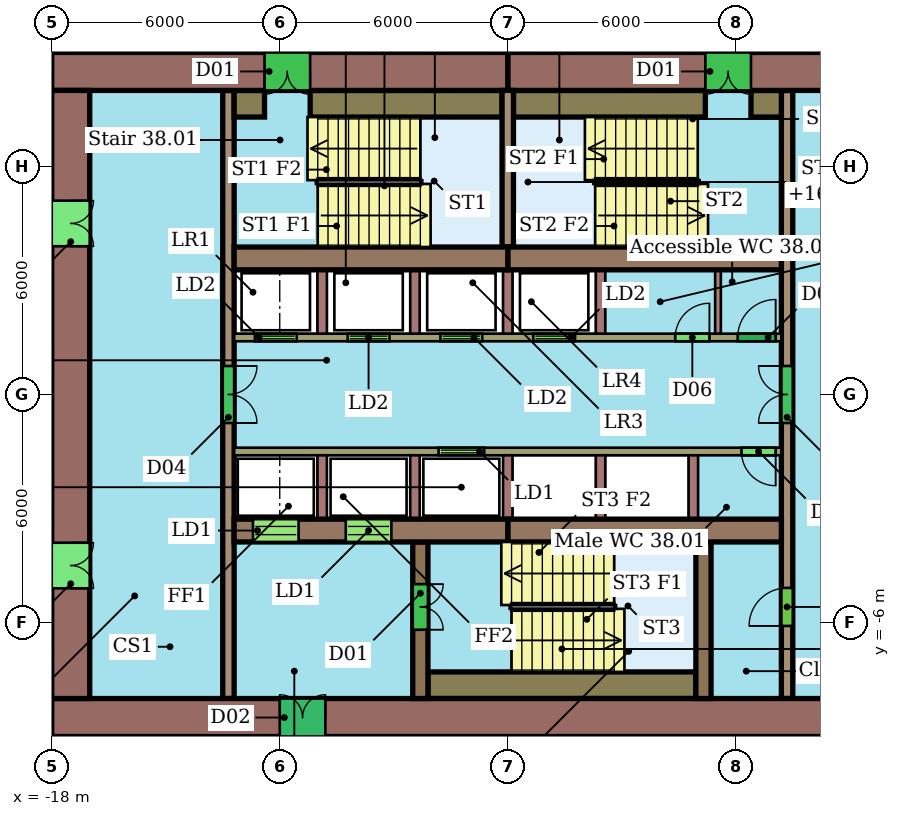
"""IFC4 building model, lengths in metres.
Left out: names, types, materials, properties, quantities, classifications, styles, units other than length and angle.
Written with IfcOpenShell. Run it as: python <this file> out.ifc"""

import sys

from ifc_helpers import new_model, si_unit, direction, frame, frame_2d, origin, place, context, subcontext, project, spatial, rectangle, extrude, element, fill, save


model = new_model("IFC4")
c1 = context("Model", 3, precision=1e-05, world=origin(), true_north=direction((0.0, 1.0)))
c2 = subcontext(c1, "Body", "Model", "MODEL_VIEW")
j1 = project(units=[si_unit("LENGTHUNIT", "METRE"), si_unit("PLANEANGLEUNIT", "RADIAN")], contexts=[c1])
p1 = place(None, origin())
s1 = spatial("IfcSite", under=j1, at=p1, CompositionType="ELEMENT")
p2 = place(p1, origin())
s2 = spatial("IfcBuilding", under=s1, at=p2, CompositionType="ELEMENT")
p3 = place(p2, frame((0.0, 0.0, 161.4)))
s3 = spatial("IfcBuildingStorey", under=s2, at=p3, CompositionType="ELEMENT", Elevation=161.4)
p4 = place(p3, frame((6.0, 8.5, 0.0), z_axis=(0.0, 0.0, 1.0), x_axis=(-1.0, 0.0, 0.0)))
e1 = element("IfcWall", 1, at=p4, inside=s3, PredefinedType="SHEAR", context=c2, shape_type="SweptSolid", body=[
    extrude(rectangle(XDim=12.0, YDim=1.0, at=frame_2d((6.0, 0.0))), origin(), (0.0, 0.0, 1.0), 3.3),
])
p5 = place(p4, frame((5.6, 0.0, 0.0)))
e2 = element("IfcOpeningElement", 2, at=p5, cuts=e1, PredefinedType="OPENING", context=c2, shape_type="SweptSolid", body=[
    extrude(rectangle(XDim=1.2, YDim=2.1, at=frame_2d((0.6, 1.05))), frame((0.0, 0.51, 0.0), z_axis=(0.0, -1.0, 0.0), x_axis=(1.0, 0.0, 0.0)), (0.0, 0.0, 1.0), 1.02),
])
p6 = place(p3, frame((-6.0, 8.5, 0.0), z_axis=(0.0, 0.0, 1.0), x_axis=(-1.0, 0.0, 0.0)))
e3 = element("IfcWall", 3, at=p6, inside=s3, PredefinedType="SHEAR", context=c2, shape_type="SweptSolid", body=[
    extrude(rectangle(XDim=12.0, YDim=1.0, at=frame_2d((6.0, 0.0))), origin(), (0.0, 0.0, 1.0), 3.3),
])
p7 = place(p6, frame((5.2, 0.0, 0.0)))
e4 = element("IfcOpeningElement", 4, at=p7, cuts=e3, PredefinedType="OPENING", context=c2, shape_type="SweptSolid", body=[
    extrude(rectangle(XDim=1.2, YDim=2.1, at=frame_2d((0.6, 1.05))), frame((0.0, 0.51, 0.0), z_axis=(0.0, -1.0, 0.0), x_axis=(1.0, 0.0, 0.0)), (0.0, 0.0, 1.0), 1.02),
])
p8 = place(p3, frame((-18.0, -8.5, 0.0), z_axis=(0.0, 0.0, 1.0), x_axis=(1.0, 0.0, 0.0)))
e5 = element("IfcWall", 5, at=p8, inside=s3, PredefinedType="SHEAR", context=c2, shape_type="SweptSolid", body=[
    extrude(rectangle(XDim=24.0, YDim=1.0, at=frame_2d((12.0, 0.0))), origin(), (0.0, 0.0, 1.0), 3.3),
])
p9 = place(p8, frame((6.0, 0.0, 0.0)))
e6 = element("IfcOpeningElement", 6, at=p9, cuts=e5, PredefinedType="OPENING", context=c2, shape_type="SweptSolid", body=[
    extrude(rectangle(XDim=1.2, YDim=2.1, at=frame_2d((0.6, 1.05))), frame((0.0, 0.51, 0.0), z_axis=(0.0, -1.0, 0.0), x_axis=(1.0, 0.0, 0.0)), (0.0, 0.0, 1.0), 1.02),
])
p10 = place(p3, frame((-17.5, 8.0, 0.0), z_axis=(0.0, 0.0, 1.0), x_axis=(0.0, -1.0, 0.0)))
e7 = element("IfcWall", 7, at=p10, inside=s3, PredefinedType="SHEAR", context=c2, shape_type="SweptSolid", body=[
    extrude(rectangle(XDim=16.0, YDim=1.0, at=frame_2d((8.0, 0.0))), origin(), (0.0, 0.0, 1.0), 3.3),
])
p11 = place(p10, frame((11.9, 0.0, 0.0)))
e8 = element("IfcOpeningElement", 8, at=p11, cuts=e7, PredefinedType="OPENING", context=c2, shape_type="SweptSolid", body=[
    extrude(rectangle(XDim=1.2, YDim=2.1, at=frame_2d((0.6, 1.05))), frame((0.0, 0.51, 0.0), z_axis=(0.0, -1.0, 0.0), x_axis=(1.0, 0.0, 0.0)), (0.0, 0.0, 1.0), 1.02),
])
p12 = place(p10, frame((2.9, 0.0, 0.0)))
e9 = element("IfcOpeningElement", 9, at=p12, cuts=e7, PredefinedType="OPENING", context=c2, shape_type="SweptSolid", body=[
    extrude(rectangle(XDim=1.2, YDim=2.1, at=frame_2d((0.6, 1.05))), frame((0.0, 0.51, 0.0), z_axis=(0.0, -1.0, 0.0), x_axis=(1.0, 0.0, 0.0)), (0.0, 0.0, 1.0), 1.02),
])
for number, where, z_axis, x_axis in (
    (10, (-13.2, 3.58, 0.0), (0.0, 0.0, 1.0), (1.0, 0.0, 0.0)),
    (11, (-6.0, 3.58, 0.0), (0.0, 0.0, 1.0), (1.0, 0.0, 0.0)),
):
    element("IfcWall", number, at=place(p3, frame(where, z_axis=z_axis, x_axis=x_axis)), inside=s3, PredefinedType="SHEAR", context=c2, shape_type="SweptSolid", body=[
        extrude(rectangle(XDim=7.2, YDim=0.6, at=frame_2d((3.6, 0.0))), origin(), (0.0, 0.0, 1.0), 3.3),
    ])
p13 = place(p3, frame((-13.2, -3.58, 0.0), z_axis=(0.0, 0.0, 1.0), x_axis=(1.0, 0.0, 0.0)))
e12 = element("IfcWall", 12, at=p13, inside=s3, PredefinedType="SHEAR", context=c2, shape_type="SweptSolid", body=[
    extrude(rectangle(XDim=7.2, YDim=0.6, at=frame_2d((3.6, 0.0))), origin(), (0.0, 0.0, 1.0), 3.3),
])
p14 = place(p13, frame((0.496, 0.0, 0.0)))
e13 = element("IfcOpeningElement", 13, at=p14, cuts=e12, PredefinedType="OPENING", context=c2, shape_type="SweptSolid", body=[
    extrude(rectangle(XDim=1.2, YDim=2.1, at=frame_2d((0.6, 1.05))), frame((0.0, 0.31, 0.0), z_axis=(0.0, -1.0, 0.0), x_axis=(1.0, 0.0, 0.0)), (0.0, 0.0, 1.0), 0.62),
])
p15 = place(p13, frame((2.938, 0.0, 0.0)))
e14 = element("IfcOpeningElement", 14, at=p15, cuts=e12, PredefinedType="OPENING", context=c2, shape_type="SweptSolid", body=[
    extrude(rectangle(XDim=1.2, YDim=2.1, at=frame_2d((0.6, 1.05))), frame((0.0, 0.31, 0.0), z_axis=(0.0, -1.0, 0.0), x_axis=(1.0, 0.0, 0.0)), (0.0, 0.0, 1.0), 0.62),
])
p16 = place(p3, frame((-6.0, -3.58, 0.0), z_axis=(0.0, 0.0, 1.0), x_axis=(1.0, 0.0, 0.0)))
e15 = element("IfcWall", 15, at=p16, inside=s3, PredefinedType="SHEAR", context=c2, shape_type="SweptSolid", body=[
    extrude(rectangle(XDim=7.2, YDim=0.6, at=frame_2d((3.6, 0.0))), origin(), (0.0, 0.0, 1.0), 3.3),
])
p17 = place(p3, frame((-13.35, 8.0, 0.0), z_axis=(0.0, 0.0, 1.0), x_axis=(0.0, -1.0, 0.0)))
e16 = element("IfcWall", 16, at=p17, inside=s3, PredefinedType="SHEAR", context=c2, shape_type="SweptSolid", body=[
    extrude(rectangle(XDim=16.0, YDim=0.3, at=frame_2d((8.0, 0.0))), origin(), (0.0, 0.0, 1.0), 3.3),
])
p18 = place(p17, frame((7.25, 0.0, 0.0)))
e17 = element("IfcOpeningElement", 17, at=p18, cuts=e16, PredefinedType="OPENING", context=c2, shape_type="SweptSolid", body=[
    extrude(rectangle(XDim=1.5, YDim=2.1, at=frame_2d((0.75, 1.05))), frame((0.0, 0.16, 0.0), z_axis=(0.0, -1.0, 0.0), x_axis=(1.0, 0.0, 0.0)), (0.0, 0.0, 1.0), 0.32),
])
p19 = place(p3, frame((1.35, -8.0, 0.0), z_axis=(0.0, 0.0, 1.0), x_axis=(0.0, 1.0, 0.0)))
e18 = element("IfcWall", 18, at=p19, inside=s3, PredefinedType="SHEAR", context=c2, shape_type="SweptSolid", body=[
    extrude(rectangle(XDim=16.0, YDim=0.3, at=frame_2d((8.0, 0.0))), origin(), (0.0, 0.0, 1.0), 3.3),
])
p20 = place(p19, frame((1.91, 0.0, 0.0)))
e19 = element("IfcOpeningElement", 19, at=p20, cuts=e18, PredefinedType="OPENING", context=c2, shape_type="SweptSolid", body=[
    extrude(rectangle(XDim=1.0, YDim=2.1, at=frame_2d((0.5, 1.05))), frame((0.0, 0.16, 0.0), z_axis=(0.0, -1.0, 0.0), x_axis=(1.0, 0.0, 0.0)), (0.0, 0.0, 1.0), 0.32),
])
p21 = place(p19, frame((7.25, 0.0, 0.0)))
e20 = element("IfcOpeningElement", 20, at=p21, cuts=e18, PredefinedType="OPENING", context=c2, shape_type="SweptSolid", body=[
    extrude(rectangle(XDim=1.5, YDim=2.1, at=frame_2d((0.75, 1.05))), frame((0.0, 0.16, 0.0), z_axis=(0.0, -1.0, 0.0), x_axis=(1.0, 0.0, 0.0)), (0.0, 0.0, 1.0), 0.32),
])
p22 = place(p3, frame((-13.2, 1.5, 0.0), z_axis=(0.0, 0.0, 1.0), x_axis=(1.0, 0.0, 0.0)))
e21 = element("IfcWall", 21, at=p22, inside=s3, PredefinedType="SHEAR", context=c2, shape_type="SweptSolid", body=[
    extrude(rectangle(XDim=14.4, YDim=0.2, at=frame_2d((7.2, 0.0))), origin(), (0.0, 0.0, 1.0), 3.3),
])
p23 = place(p22, frame((0.546, 0.0, 0.0)))
e22 = element("IfcOpeningElement", 22, at=p23, cuts=e21, PredefinedType="OPENING", context=c2, shape_type="SweptSolid", body=[
    extrude(rectangle(XDim=1.1, YDim=2.1, at=frame_2d((0.55, 1.05))), frame((0.0, 0.11, 0.0), z_axis=(0.0, -1.0, 0.0), x_axis=(1.0, 0.0, 0.0)), (0.0, 0.0, 1.0), 0.22),
])
p24 = place(p22, frame((2.988, 0.0, 0.0)))
e23 = element("IfcOpeningElement", 23, at=p24, cuts=e21, PredefinedType="OPENING", context=c2, shape_type="SweptSolid", body=[
    extrude(rectangle(XDim=1.1, YDim=2.1, at=frame_2d((0.55, 1.05))), frame((0.0, 0.11, 0.0), z_axis=(0.0, -1.0, 0.0), x_axis=(1.0, 0.0, 0.0)), (0.0, 0.0, 1.0), 0.22),
])
p25 = place(p22, frame((5.429, 0.0, 0.0)))
e24 = element("IfcOpeningElement", 24, at=p25, cuts=e21, PredefinedType="OPENING", context=c2, shape_type="SweptSolid", body=[
    extrude(rectangle(XDim=1.1, YDim=2.1, at=frame_2d((0.55, 1.05))), frame((0.0, 0.11, 0.0), z_axis=(0.0, -1.0, 0.0), x_axis=(1.0, 0.0, 0.0)), (0.0, 0.0, 1.0), 0.22),
])
p26 = place(p22, frame((7.871, 0.0, 0.0)))
e25 = element("IfcOpeningElement", 25, at=p26, cuts=e21, PredefinedType="OPENING", context=c2, shape_type="SweptSolid", body=[
    extrude(rectangle(XDim=1.1, YDim=2.1, at=frame_2d((0.55, 1.05))), frame((0.0, 0.11, 0.0), z_axis=(0.0, -1.0, 0.0), x_axis=(1.0, 0.0, 0.0)), (0.0, 0.0, 1.0), 0.22),
])
p27 = place(p22, frame((11.607, 0.0, 0.0)))
e26 = element("IfcOpeningElement", 26, at=p27, cuts=e21, PredefinedType="OPENING", context=c2, shape_type="SweptSolid", body=[
    extrude(rectangle(XDim=0.9, YDim=2.1, at=frame_2d((0.45, 1.05))), frame((0.0, 0.11, 0.0), z_axis=(0.0, -1.0, 0.0), x_axis=(1.0, 0.0, 0.0)), (0.0, 0.0, 1.0), 0.22),
])
p28 = place(p22, frame((13.25, 0.0, 0.0)))
e27 = element("IfcOpeningElement", 27, at=p28, cuts=e21, PredefinedType="OPENING", context=c2, shape_type="SweptSolid", body=[
    extrude(rectangle(XDim=1.0, YDim=2.1, at=frame_2d((0.5, 1.05))), frame((0.0, 0.11, 0.0), z_axis=(0.0, -1.0, 0.0), x_axis=(1.0, 0.0, 0.0)), (0.0, 0.0, 1.0), 0.22),
])
p29 = place(p3, frame((1.2, -1.5, 0.0), z_axis=(0.0, 0.0, 1.0), x_axis=(-1.0, 0.0, 0.0)))
e28 = element("IfcWall", 28, at=p29, inside=s3, PredefinedType="SHEAR", context=c2, shape_type="SweptSolid", body=[
    extrude(rectangle(XDim=14.4, YDim=0.2, at=frame_2d((7.2, 0.0))), origin(), (0.0, 0.0, 1.0), 3.3),
])
p30 = place(p29, frame((7.821, 0.0, 0.0)))
e29 = element("IfcOpeningElement", 29, at=p30, cuts=e28, PredefinedType="OPENING", context=c2, shape_type="SweptSolid", body=[
    extrude(rectangle(XDim=1.2, YDim=2.1, at=frame_2d((0.6, 1.05))), frame((0.0, 0.11, 0.0), z_axis=(0.0, -1.0, 0.0), x_axis=(1.0, 0.0, 0.0)), (0.0, 0.0, 1.0), 0.22),
])
p31 = place(p29, frame((0.15, 0.0, 0.0)))
e30 = element("IfcOpeningElement", 30, at=p31, cuts=e28, PredefinedType="OPENING", context=c2, shape_type="SweptSolid", body=[
    extrude(rectangle(XDim=0.9, YDim=2.1, at=frame_2d((0.45, 1.05))), frame((0.0, 0.11, 0.0), z_axis=(0.0, -1.0, 0.0), x_axis=(1.0, 0.0, 0.0)), (0.0, 0.0, 1.0), 0.22),
])
p32 = place(p3, frame((-8.3, -3.88, 0.0), z_axis=(0.0, 0.0, 1.0), x_axis=(0.0, -1.0, 0.0)))
e31 = element("IfcWall", 31, at=p32, inside=s3, PredefinedType="SHEAR", context=c2, shape_type="SweptSolid", body=[
    extrude(rectangle(XDim=4.12, YDim=0.4, at=frame_2d((2.06, 0.0))), origin(), (0.0, 0.0, 1.0), 3.3),
])
p33 = place(p32, frame((1.11, 0.0, 0.0)))
e32 = element("IfcOpeningElement", 32, at=p33, cuts=e31, PredefinedType="OPENING", context=c2, shape_type="SweptSolid", body=[
    extrude(rectangle(XDim=1.2, YDim=2.1, at=frame_2d((0.6, 1.05))), frame((0.0, 0.21, 0.0), z_axis=(0.0, -1.0, 0.0), x_axis=(1.0, 0.0, 0.0)), (0.0, 0.0, 1.0), 0.42),
])
p34 = place(p3, frame((-0.85, -3.88, 0.0), z_axis=(0.0, 0.0, 1.0), x_axis=(0.0, -1.0, 0.0)))
e33 = element("IfcWall", 33, at=p34, inside=s3, PredefinedType="SHEAR", context=c2, shape_type="SweptSolid", body=[
    extrude(rectangle(XDim=4.12, YDim=0.4, at=frame_2d((2.06, 0.0))), origin(), (0.0, 0.0, 1.0), 3.3),
])
p35 = place(p3, frame((-6.0, 3.88, 0.0), z_axis=(0.0, 0.0, 1.0), x_axis=(0.0, 1.0, 0.0)))
e34 = element("IfcWall", 34, at=p35, inside=s3, PredefinedType="SHEAR", context=c2, shape_type="SweptSolid", body=[
    extrude(rectangle(XDim=4.12, YDim=0.3, at=frame_2d((2.06, 0.0))), origin(), (0.0, 0.0, 1.0), 3.3),
])
p36 = place(p3, frame((-13.2, 7.65, 0.0), z_axis=(0.0, 0.0, 1.0), x_axis=(1.0, 0.0, 0.0)))
e35 = element("IfcWall", 35, at=p36, inside=s3, PredefinedType="SHEAR", context=c2, shape_type="SweptSolid", body=[
    extrude(rectangle(XDim=0.8, YDim=0.7, at=frame_2d((0.4, 0.0))), origin(), (0.0, 0.0, 1.0), 3.3),
])
for number, where, z_axis, x_axis in (
    (36, (-11.2, 7.65, 0.0), (0.0, 0.0, 1.0), (1.0, 0.0, 0.0)),
    (37, (-5.85, 7.65, 0.0), (0.0, 0.0, 1.0), (1.0, 0.0, 0.0)),
):
    element("IfcWall", number, at=place(p3, frame(where, z_axis=z_axis, x_axis=x_axis)), inside=s3, PredefinedType="SHEAR", context=c2, shape_type="SweptSolid", body=[
        extrude(rectangle(XDim=5.05, YDim=0.7, at=frame_2d((2.525, 0.0))), origin(), (0.0, 0.0, 1.0), 3.3),
    ])
p37 = place(p3, frame((0.4, 7.65, 0.0), z_axis=(0.0, 0.0, 1.0), x_axis=(1.0, 0.0, 0.0)))
e38 = element("IfcWall", 38, at=p37, inside=s3, PredefinedType="SHEAR", context=c2, shape_type="SweptSolid", body=[
    extrude(rectangle(XDim=0.8, YDim=0.7, at=frame_2d((0.4, 0.0))), origin(), (0.0, 0.0, 1.0), 3.3),
])
p38 = place(p3, frame((-8.1, -7.65, 0.0), z_axis=(0.0, 0.0, 1.0), x_axis=(1.0, 0.0, 0.0)))
e39 = element("IfcWall", 39, at=p38, inside=s3, PredefinedType="SHEAR", context=c2, shape_type="SweptSolid", body=[
    extrude(rectangle(XDim=7.05, YDim=0.7, at=frame_2d((3.525, 0.0))), origin(), (0.0, 0.0, 1.0), 3.3),
])
for number, where, z_axis, x_axis in (
    (40, (-10.883, 1.6, 0.0), (0.0, 0.0, 1.0), (0.0, 1.0, 0.0)),
    (41, (-8.442, 1.6, 0.0), (0.0, 0.0, 1.0), (0.0, 1.0, 0.0)),
    (42, (-6.0, 1.6, 0.0), (0.0, 0.0, 1.0), (0.0, 1.0, 0.0)),
    (43, (-3.558, 1.6, 0.0), (0.0, 0.0, 1.0), (0.0, 1.0, 0.0)),
):
    element("IfcWall", number, at=place(p3, frame(where, z_axis=z_axis, x_axis=x_axis)), inside=s3, PredefinedType="SHEAR", context=c2, shape_type="SweptSolid", body=[
        extrude(rectangle(XDim=1.68, YDim=0.25, at=frame_2d((0.84, 0.0))), origin(), (0.0, 0.0, 1.0), 3.3),
    ])
p39 = place(p3, frame((-0.468, 1.6, 0.0), z_axis=(0.0, 0.0, 1.0), x_axis=(0.0, 1.0, 0.0)))
e44 = element("IfcWall", 44, at=p39, inside=s3, PredefinedType="PARTITIONING", context=c2, shape_type="SweptSolid", body=[
    extrude(rectangle(XDim=1.68, YDim=0.15, at=frame_2d((0.84, 0.0))), origin(), (0.0, 0.0, 1.0), 3.3),
])
for number, where, z_axis, x_axis in (
    (45, (-10.883, -1.6, 0.0), (0.0, 0.0, 1.0), (0.0, -1.0, 0.0)),
    (46, (-8.442, -1.6, 0.0), (0.0, 0.0, 1.0), (0.0, -1.0, 0.0)),
    (47, (-6.0, -1.6, 0.0), (0.0, 0.0, 1.0), (0.0, -1.0, 0.0)),
    (48, (-3.558, -1.6, 0.0), (0.0, 0.0, 1.0), (0.0, -1.0, 0.0)),
    (49, (-1.117, -1.6, 0.0), (0.0, 0.0, 1.0), (0.0, -1.0, 0.0)),
):
    element("IfcWall", number, at=place(p3, frame(where, z_axis=z_axis, x_axis=x_axis)), inside=s3, PredefinedType="SHEAR", context=c2, shape_type="SweptSolid", body=[
        extrude(rectangle(XDim=1.68, YDim=0.25, at=frame_2d((0.84, 0.0))), origin(), (0.0, 0.0, 1.0), 3.3),
    ])
p40 = place(p5, origin())
e50 = element("IfcDoor", 50, at=p40, inside=s3, OperationType="DOUBLE_DOOR_SINGLE_SWING", PredefinedType="NOTDEFINED", context=c2, shape_type="SweptSolid", body=[
    extrude(rectangle(XDim=1.2, YDim=2.1, at=frame_2d((0.6, 1.05))), frame((0.0, 0.025, 0.0), z_axis=(0.0, -1.0, 0.0), x_axis=(1.0, 0.0, 0.0)), (0.0, 0.0, 1.0), 0.05),
])
fill(e2, e50)
p41 = place(p7, origin())
e51 = element("IfcDoor", 51, at=p41, inside=s3, OperationType="DOUBLE_DOOR_SINGLE_SWING", PredefinedType="NOTDEFINED", context=c2, shape_type="SweptSolid", body=[
    extrude(rectangle(XDim=1.2, YDim=2.1, at=frame_2d((0.6, 1.05))), frame((0.0, 0.025, 0.0), z_axis=(0.0, -1.0, 0.0), x_axis=(1.0, 0.0, 0.0)), (0.0, 0.0, 1.0), 0.05),
])
fill(e4, e51)
p42 = place(p9, origin())
e52 = element("IfcDoor", 52, at=p42, inside=s3, OperationType="DOUBLE_DOOR_SINGLE_SWING", PredefinedType="NOTDEFINED", context=c2, shape_type="SweptSolid", body=[
    extrude(rectangle(XDim=1.2, YDim=2.1, at=frame_2d((0.6, 1.05))), frame((0.0, 0.025, 0.0), z_axis=(0.0, -1.0, 0.0), x_axis=(1.0, 0.0, 0.0)), (0.0, 0.0, 1.0), 0.05),
])
fill(e6, e52)
p43 = place(p11, origin())
e53 = element("IfcDoor", 53, at=p43, inside=s3, OperationType="DOUBLE_DOOR_SINGLE_SWING", PredefinedType="NOTDEFINED", context=c2, shape_type="SweptSolid", body=[
    extrude(rectangle(XDim=1.2, YDim=2.1, at=frame_2d((0.6, 1.05))), frame((0.0, 0.025, 0.0), z_axis=(0.0, -1.0, 0.0), x_axis=(1.0, 0.0, 0.0)), (0.0, 0.0, 1.0), 0.05),
])
fill(e8, e53)
p44 = place(p12, origin())
e54 = element("IfcDoor", 54, at=p44, inside=s3, OperationType="DOUBLE_DOOR_SINGLE_SWING", PredefinedType="NOTDEFINED", context=c2, shape_type="SweptSolid", body=[
    extrude(rectangle(XDim=1.2, YDim=2.1, at=frame_2d((0.6, 1.05))), frame((0.0, 0.025, 0.0), z_axis=(0.0, -1.0, 0.0), x_axis=(1.0, 0.0, 0.0)), (0.0, 0.0, 1.0), 0.05),
])
fill(e9, e54)
p45 = place(p14, origin())
e55 = element("IfcDoor", 55, at=p45, inside=s3, OperationType="DOUBLE_DOOR_SLIDING", PredefinedType="NOTDEFINED", context=c2, shape_type="SweptSolid", body=[
    extrude(rectangle(XDim=1.2, YDim=2.1, at=frame_2d((0.6, 1.05))), frame((0.0, 0.025, 0.0), z_axis=(0.0, -1.0, 0.0), x_axis=(1.0, 0.0, 0.0)), (0.0, 0.0, 1.0), 0.05),
])
fill(e13, e55)
p46 = place(p15, origin())
e56 = element("IfcDoor", 56, at=p46, inside=s3, OperationType="DOUBLE_DOOR_SLIDING", PredefinedType="NOTDEFINED", context=c2, shape_type="SweptSolid", body=[
    extrude(rectangle(XDim=1.2, YDim=2.1, at=frame_2d((0.6, 1.05))), frame((0.0, 0.025, 0.0), z_axis=(0.0, -1.0, 0.0), x_axis=(1.0, 0.0, 0.0)), (0.0, 0.0, 1.0), 0.05),
])
fill(e14, e56)
p47 = place(p18, origin())
e57 = element("IfcDoor", 57, at=p47, inside=s3, OperationType="DOUBLE_DOOR_SINGLE_SWING", PredefinedType="NOTDEFINED", context=c2, shape_type="SweptSolid", body=[
    extrude(rectangle(XDim=1.5, YDim=2.1, at=frame_2d((0.75, 1.05))), frame((0.0, 0.025, 0.0), z_axis=(0.0, -1.0, 0.0), x_axis=(1.0, 0.0, 0.0)), (0.0, 0.0, 1.0), 0.05),
])
fill(e17, e57)
p48 = place(p20, origin())
e58 = element("IfcDoor", 58, at=p48, inside=s3, OperationType="SINGLE_SWING_LEFT", PredefinedType="NOTDEFINED", context=c2, shape_type="SweptSolid", body=[
    extrude(rectangle(XDim=1.0, YDim=2.1, at=frame_2d((0.5, 1.05))), frame((0.0, 0.025, 0.0), z_axis=(0.0, -1.0, 0.0), x_axis=(1.0, 0.0, 0.0)), (0.0, 0.0, 1.0), 0.05),
])
fill(e19, e58)
p49 = place(p21, origin())
e59 = element("IfcDoor", 59, at=p49, inside=s3, OperationType="DOUBLE_DOOR_SINGLE_SWING", PredefinedType="NOTDEFINED", context=c2, shape_type="SweptSolid", body=[
    extrude(rectangle(XDim=1.5, YDim=2.1, at=frame_2d((0.75, 1.05))), frame((0.0, 0.025, 0.0), z_axis=(0.0, -1.0, 0.0), x_axis=(1.0, 0.0, 0.0)), (0.0, 0.0, 1.0), 0.05),
])
fill(e20, e59)
p50 = place(p23, origin())
e60 = element("IfcDoor", 60, at=p50, inside=s3, OperationType="DOUBLE_DOOR_SLIDING", PredefinedType="NOTDEFINED", context=c2, shape_type="SweptSolid", body=[
    extrude(rectangle(XDim=1.1, YDim=2.1, at=frame_2d((0.55, 1.05))), frame((0.0, 0.025, 0.0), z_axis=(0.0, -1.0, 0.0), x_axis=(1.0, 0.0, 0.0)), (0.0, 0.0, 1.0), 0.05),
])
fill(e22, e60)
p51 = place(p24, origin())
e61 = element("IfcDoor", 61, at=p51, inside=s3, OperationType="DOUBLE_DOOR_SLIDING", PredefinedType="NOTDEFINED", context=c2, shape_type="SweptSolid", body=[
    extrude(rectangle(XDim=1.1, YDim=2.1, at=frame_2d((0.55, 1.05))), frame((0.0, 0.025, 0.0), z_axis=(0.0, -1.0, 0.0), x_axis=(1.0, 0.0, 0.0)), (0.0, 0.0, 1.0), 0.05),
])
fill(e23, e61)
p52 = place(p25, origin())
e62 = element("IfcDoor", 62, at=p52, inside=s3, OperationType="DOUBLE_DOOR_SLIDING", PredefinedType="NOTDEFINED", context=c2, shape_type="SweptSolid", body=[
    extrude(rectangle(XDim=1.1, YDim=2.1, at=frame_2d((0.55, 1.05))), frame((0.0, 0.025, 0.0), z_axis=(0.0, -1.0, 0.0), x_axis=(1.0, 0.0, 0.0)), (0.0, 0.0, 1.0), 0.05),
])
fill(e24, e62)
p53 = place(p26, origin())
e63 = element("IfcDoor", 63, at=p53, inside=s3, OperationType="DOUBLE_DOOR_SLIDING", PredefinedType="NOTDEFINED", context=c2, shape_type="SweptSolid", body=[
    extrude(rectangle(XDim=1.1, YDim=2.1, at=frame_2d((0.55, 1.05))), frame((0.0, 0.025, 0.0), z_axis=(0.0, -1.0, 0.0), x_axis=(1.0, 0.0, 0.0)), (0.0, 0.0, 1.0), 0.05),
])
fill(e25, e63)
p54 = place(p27, origin())
e64 = element("IfcDoor", 64, at=p54, inside=s3, OperationType="SINGLE_SWING_RIGHT", PredefinedType="NOTDEFINED", context=c2, shape_type="SweptSolid", body=[
    extrude(rectangle(XDim=0.9, YDim=2.1, at=frame_2d((0.45, 1.05))), frame((0.0, 0.025, 0.0), z_axis=(0.0, -1.0, 0.0), x_axis=(1.0, 0.0, 0.0)), (0.0, 0.0, 1.0), 0.05),
])
fill(e26, e64)
p55 = place(p28, origin())
e65 = element("IfcDoor", 65, at=p55, inside=s3, OperationType="SINGLE_SWING_RIGHT", PredefinedType="NOTDEFINED", context=c2, shape_type="SweptSolid", body=[
    extrude(rectangle(XDim=1.0, YDim=2.1, at=frame_2d((0.5, 1.05))), frame((0.0, 0.025, 0.0), z_axis=(0.0, -1.0, 0.0), x_axis=(1.0, 0.0, 0.0)), (0.0, 0.0, 1.0), 0.05),
])
fill(e27, e65)
p56 = place(p30, origin())
e66 = element("IfcDoor", 66, at=p56, inside=s3, OperationType="DOUBLE_DOOR_SLIDING", PredefinedType="NOTDEFINED", context=c2, shape_type="SweptSolid", body=[
    extrude(rectangle(XDim=1.2, YDim=2.1, at=frame_2d((0.6, 1.05))), frame((0.0, 0.025, 0.0), z_axis=(0.0, -1.0, 0.0), x_axis=(1.0, 0.0, 0.0)), (0.0, 0.0, 1.0), 0.05),
])
fill(e29, e66)
p57 = place(p31, origin())
e67 = element("IfcDoor", 67, at=p57, inside=s3, OperationType="SINGLE_SWING_LEFT", PredefinedType="NOTDEFINED", context=c2, shape_type="SweptSolid", body=[
    extrude(rectangle(XDim=0.9, YDim=2.1, at=frame_2d((0.45, 1.05))), frame((0.0, 0.025, 0.0), z_axis=(0.0, -1.0, 0.0), x_axis=(1.0, 0.0, 0.0)), (0.0, 0.0, 1.0), 0.05),
])
fill(e30, e67)
p58 = place(p33, origin())
e68 = element("IfcDoor", 68, at=p58, inside=s3, OperationType="DOUBLE_DOOR_SINGLE_SWING", PredefinedType="NOTDEFINED", context=c2, shape_type="SweptSolid", body=[
    extrude(rectangle(XDim=1.2, YDim=2.1, at=frame_2d((0.6, 1.05))), frame((0.0, 0.025, 0.0), z_axis=(0.0, -1.0, 0.0), x_axis=(1.0, 0.0, 0.0)), (0.0, 0.0, 1.0), 0.05),
])
fill(e32, e68)
save(model, sys.argv[1])
